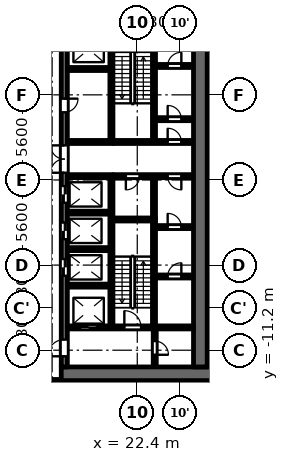
"""IFC4 building model, lengths in metres.
Left out: names, types, materials, properties, quantities, classifications, styles, units other than length and angle.
Written with IfcOpenShell. Run it as: python <this file> out.ifc"""

import sys

from ifc_helpers import new_model, si_unit, direction, frame, frame_2d, origin, origin_2d, place, context, subcontext, project, spatial, polyline, rectangle, outline, extrude, element, fill, save


model = new_model("IFC4")
c1 = context("Model", 3, precision=1e-05, world=origin(), true_north=direction((0.0, 1.0)))
c2 = subcontext(c1, "Body", "Model", "MODEL_VIEW")
j1 = project(units=[si_unit("LENGTHUNIT", "METRE"), si_unit("PLANEANGLEUNIT", "RADIAN")], contexts=[c1])
p1 = place(None, origin())
s1 = spatial("IfcSite", under=j1, at=p1, CompositionType="ELEMENT")
p2 = place(p1, origin())
s2 = spatial("IfcBuilding", under=s1, at=p2, CompositionType="ELEMENT")
p3 = place(p2, frame((0.0, 0.0, -4.5)))
s3 = spatial("IfcBuildingStorey", under=s2, at=p3, CompositionType="ELEMENT", Elevation=-4.5)
p4 = place(p3, frame((0.0, 0.0, -0.5)))
e1 = element("IfcWall", 1, at=p4, inside=s3, PredefinedType="SOLIDWALL", context=c2, shape_type="SweptSolid", body=[
    extrude(outline(polyline([(29.45, -10.0), (28.95, -10.0), (28.95, -14.49), (28.472, -16.996), (27.038, -19.105), (26.144, -20.0), (26.851, -20.0), (27.425, -19.426), (28.944, -17.191), (29.45, -14.537), (29.45, -10.0)])), origin(), (0.0, 0.0, 1.0), 5.0),
])
for number, where, z_axis, x_axis in (
    (2, (28.0, -11.2, 0.0), (0.0, 0.0, 1.0), (1.0, 0.0, 0.0)),
    (3, (28.0, -5.6, 0.0), (0.0, 0.0, 1.0), (1.0, 0.0, 0.0)),
    (4, (28.0, 0.0, 0.0), (0.0, 0.0, 1.0), (1.0, 0.0, 0.0)),
    (5, (28.0, 5.6, 0.0), (0.0, 0.0, 1.0), (1.0, 0.0, 0.0)),
):
    element("IfcColumn", number, at=place(p3, frame(where, z_axis=z_axis, x_axis=x_axis)), inside=s3, PredefinedType="COLUMN", context=c2, shape_type="SweptSolid", body=[
        extrude(rectangle(XDim=1.8, YDim=1.8, at=origin_2d()), origin(), (0.0, 0.0, 1.0), 4.5),
    ])
p5 = place(p3, frame((23.5, -2.5, 0.0), z_axis=(0.0, 0.0, 1.0), x_axis=(0.0, 1.0, 0.0)))
e6 = element("IfcWall", 6, at=p5, inside=s3, PredefinedType="PARTITIONING", context=c2, shape_type="SweptSolid", body=[
    extrude(rectangle(XDim=2.65, YDim=0.2, at=frame_2d((1.325, 0.0))), origin(), (0.0, 0.0, 1.0), 4.05),
])
p6 = place(p3, frame((20.7, 2.6, 0.0), z_axis=(0.0, 0.0, 1.0), x_axis=(0.0, 1.0, 0.0)))
e7 = element("IfcWall", 7, at=p6, inside=s3, PredefinedType="SHEAR", context=c2, shape_type="SweptSolid", body=[
    extrude(rectangle(XDim=7.0, YDim=0.2, at=frame_2d((3.5, 0.0))), origin(), (0.0, 0.0, 1.0), 4.05),
])
p7 = place(p3, frame((20.7, -9.6, 0.0), z_axis=(0.0, 0.0, 1.0), x_axis=(0.0, 1.0, 0.0)))
e8 = element("IfcWall", 8, at=p7, inside=s3, PredefinedType="SHEAR", context=c2, shape_type="SweptSolid", body=[
    extrude(rectangle(XDim=9.75, YDim=0.2, at=frame_2d((4.875, 0.0))), origin(), (0.0, 0.0, 1.0), 4.05),
])
p8 = place(p3, frame((20.8, 2.5, 0.0), z_axis=(0.0, 0.0, 1.0), x_axis=(1.0, 0.0, 0.0)))
e9 = element("IfcWall", 9, at=p8, inside=s3, PredefinedType="SHEAR", context=c2, shape_type="SweptSolid", body=[
    extrude(rectangle(XDim=5.3, YDim=0.2, at=frame_2d((2.65, 0.0))), origin(), (0.0, 0.0, 1.0), 4.05),
])
p9 = place(p8, frame((3.6, 0.0, 0.0)))
e10 = element("IfcOpeningElement", 10, at=p9, cuts=e9, PredefinedType="OPENING", context=c2, shape_type="SweptSolid", body=[
    extrude(rectangle(XDim=0.9, YDim=2.1, at=frame_2d((0.45, 1.05))), frame((0.0, 0.11, 0.0), z_axis=(0.0, -1.0, 0.0), x_axis=(1.0, 0.0, 0.0)), (0.0, 0.0, 1.0), 0.22),
])
p10 = place(p3, frame((20.8, 0.25, 0.0), z_axis=(0.0, 0.0, 1.0), x_axis=(1.0, 0.0, 0.0)))
e11 = element("IfcWall", 11, at=p10, inside=s3, PredefinedType="PARTITIONING", context=c2, shape_type="SweptSolid", body=[
    extrude(rectangle(XDim=5.3, YDim=0.2, at=frame_2d((2.65, 0.0))), origin(), (0.0, 0.0, 1.0), 4.05),
])
p11 = place(p10, frame((0.85, 0.0, 0.0)))
e12 = element("IfcOpeningElement", 12, at=p11, cuts=e11, PredefinedType="OPENING", context=c2, shape_type="SweptSolid", body=[
    extrude(rectangle(XDim=0.9, YDim=2.1, at=frame_2d((0.45, 1.05))), frame((0.0, 0.11, 0.0), z_axis=(0.0, -1.0, 0.0), x_axis=(1.0, 0.0, 0.0)), (0.0, 0.0, 1.0), 0.22),
])
p12 = place(p10, frame((3.6, 0.0, 0.0)))
e13 = element("IfcOpeningElement", 13, at=p12, cuts=e11, PredefinedType="OPENING", context=c2, shape_type="SweptSolid", body=[
    extrude(rectangle(XDim=0.9, YDim=2.1, at=frame_2d((0.45, 1.05))), frame((0.0, 0.11, 0.0), z_axis=(0.0, -1.0, 0.0), x_axis=(1.0, 0.0, 0.0)), (0.0, 0.0, 1.0), 0.22),
])
p13 = place(p3, frame((17.4, -12.75, 0.0), z_axis=(0.0, 0.0, 1.0), x_axis=(1.0, 0.0, 0.0)))
e14 = element("IfcWall", 14, at=p13, inside=s3, PredefinedType="SHEAR", context=c2, shape_type="SweptSolid", body=[
    extrude(rectangle(XDim=10.4, YDim=0.9, at=frame_2d((5.2, 0.0))), origin(), (0.0, 0.0, 1.0), 4.05),
])
p14 = place(p3, frame((17.6, -12.3, 0.0), z_axis=(0.0, 0.0, 1.0), x_axis=(0.0, 1.0, 0.0)))
e15 = element("IfcWall", 15, at=p14, inside=s3, PredefinedType="SHEAR", context=c2, shape_type="SweptSolid", body=[
    extrude(rectangle(XDim=24.6, YDim=0.4, at=frame_2d((12.3, 0.0))), origin(), (0.0, 0.0, 1.0), 4.05),
])
p15 = place(p14, frame((6.0, 0.0, 0.0)))
e16 = element("IfcOpeningElement", 16, at=p15, cuts=e15, PredefinedType="OPENING", context=c2, shape_type="SweptSolid", body=[
    extrude(rectangle(XDim=1.1, YDim=2.1, at=frame_2d((0.55, 1.05))), frame((0.0, 0.21, 0.0), z_axis=(0.0, -1.0, 0.0), x_axis=(1.0, 0.0, 0.0)), (0.0, 0.0, 1.0), 0.42),
])
p16 = place(p14, frame((8.4, 0.0, 0.0)))
e17 = element("IfcOpeningElement", 17, at=p16, cuts=e15, PredefinedType="OPENING", context=c2, shape_type="SweptSolid", body=[
    extrude(rectangle(XDim=1.1, YDim=2.1, at=frame_2d((0.55, 1.05))), frame((0.0, 0.21, 0.0), z_axis=(0.0, -1.0, 0.0), x_axis=(1.0, 0.0, 0.0)), (0.0, 0.0, 1.0), 0.42),
])
p17 = place(p14, frame((10.8, 0.0, 0.0)))
e18 = element("IfcOpeningElement", 18, at=p17, cuts=e15, PredefinedType="OPENING", context=c2, shape_type="SweptSolid", body=[
    extrude(rectangle(XDim=1.1, YDim=2.1, at=frame_2d((0.55, 1.05))), frame((0.0, 0.21, 0.0), z_axis=(0.0, -1.0, 0.0), x_axis=(1.0, 0.0, 0.0)), (0.0, 0.0, 1.0), 0.42),
])
p18 = place(p14, frame((16.75, 0.0, 0.0)))
e19 = element("IfcOpeningElement", 19, at=p18, cuts=e15, PredefinedType="OPENING", context=c2, shape_type="SweptSolid", body=[
    extrude(rectangle(XDim=0.9, YDim=2.1, at=frame_2d((0.45, 1.05))), frame((0.0, 0.21, 0.0), z_axis=(0.0, -1.0, 0.0), x_axis=(1.0, 0.0, 0.0)), (0.0, 0.0, 1.0), 0.42),
])
p19 = place(p14, frame((22.8, 0.0, 0.0)))
e20 = element("IfcOpeningElement", 20, at=p19, cuts=e15, PredefinedType="OPENING", context=c2, shape_type="SweptSolid", body=[
    extrude(rectangle(XDim=1.1, YDim=2.1, at=frame_2d((0.55, 1.05))), frame((0.0, 0.21, 0.0), z_axis=(0.0, -1.0, 0.0), x_axis=(1.0, 0.0, 0.0)), (0.0, 0.0, 1.0), 0.42),
])
p20 = place(p14, frame((0.7, 0.0, 0.0)))
e21 = element("IfcOpeningElement", 21, at=p20, cuts=e15, PredefinedType="OPENING", context=c2, shape_type="SweptSolid", body=[
    extrude(rectangle(XDim=1.1, YDim=2.1, at=frame_2d((0.55, 1.05))), frame((0.0, 0.21, 0.0), z_axis=(0.0, -1.0, 0.0), x_axis=(1.0, 0.0, 0.0)), (0.0, 0.0, 1.0), 0.42),
])
p21 = place(p14, frame((12.775, 0.0, 0.0)))
e22 = element("IfcOpeningElement", 22, at=p21, cuts=e15, PredefinedType="OPENING", context=c2, shape_type="SweptSolid", body=[
    extrude(rectangle(XDim=1.8, YDim=2.1, at=frame_2d((0.9, 1.05))), frame((0.0, 0.21, 0.0), z_axis=(0.0, -1.0, 0.0), x_axis=(1.0, 0.0, 0.0)), (0.0, 0.0, 1.0), 0.42),
])
p22 = place(p3, frame((26.55, -12.3, 0.0), z_axis=(0.0, 0.0, 1.0), x_axis=(0.0, 1.0, 0.0)))
e23 = element("IfcWall", 23, at=p22, inside=s3, PredefinedType="SHEAR", context=c2, shape_type="SweptSolid", body=[
    extrude(rectangle(XDim=24.6, YDim=0.9, at=frame_2d((12.3, 0.0))), origin(), (0.0, 0.0, 1.0), 4.05),
])
p23 = place(p3, frame((23.55, -12.3, 0.0), z_axis=(0.0, 0.0, 1.0), x_axis=(0.0, 1.0, 0.0)))
e24 = element("IfcWall", 24, at=p23, inside=s3, PredefinedType="PARTITIONING", context=c2, shape_type="SweptSolid", body=[
    extrude(rectangle(XDim=2.5, YDim=0.2, at=frame_2d((1.25, 0.0))), origin(), (0.0, 0.0, 1.0), 4.05),
])
p24 = place(p23, frame((0.8, 0.0, 0.0)))
e25 = element("IfcOpeningElement", 25, at=p24, cuts=e24, PredefinedType="OPENING", context=c2, shape_type="SweptSolid", body=[
    extrude(rectangle(XDim=0.9, YDim=2.1, at=frame_2d((0.45, 1.05))), frame((0.0, 0.11, 0.0), z_axis=(0.0, -1.0, 0.0), x_axis=(1.0, 0.0, 0.0)), (0.0, 0.0, 1.0), 0.22),
])
p25 = place(p3, frame((23.6, -6.35, 0.0), z_axis=(0.0, 0.0, 1.0), x_axis=(1.0, 0.0, 0.0)))
e26 = element("IfcWall", 26, at=p25, inside=s3, PredefinedType="PARTITIONING", context=c2, shape_type="SweptSolid", body=[
    extrude(rectangle(XDim=2.5, YDim=0.2, at=frame_2d((1.25, 0.0))), origin(), (0.0, 0.0, 1.0), 4.05),
])
p26 = place(p25, frame((0.8, 0.0, 0.0)))
e27 = element("IfcOpeningElement", 27, at=p26, cuts=e26, PredefinedType="OPENING", context=c2, shape_type="SweptSolid", body=[
    extrude(rectangle(XDim=0.9, YDim=2.1, at=frame_2d((0.45, 1.05))), frame((0.0, 0.11, 0.0), z_axis=(0.0, -1.0, 0.0), x_axis=(1.0, 0.0, 0.0)), (0.0, 0.0, 1.0), 0.22),
])
p27 = place(p3, frame((23.6, -3.1, 0.0), z_axis=(0.0, 0.0, 1.0), x_axis=(1.0, 0.0, 0.0)))
e28 = element("IfcWall", 28, at=p27, inside=s3, PredefinedType="PARTITIONING", context=c2, shape_type="SweptSolid", body=[
    extrude(rectangle(XDim=2.5, YDim=0.2, at=frame_2d((1.25, 0.0))), origin(), (0.0, 0.0, 1.0), 4.05),
])
p28 = place(p27, frame((0.8, 0.0, 0.0)))
e29 = element("IfcOpeningElement", 29, at=p28, cuts=e28, PredefinedType="OPENING", context=c2, shape_type="SweptSolid", body=[
    extrude(rectangle(XDim=0.9, YDim=2.1, at=frame_2d((0.45, 1.05))), frame((0.0, 0.11, 0.0), z_axis=(0.0, -1.0, 0.0), x_axis=(1.0, 0.0, 0.0)), (0.0, 0.0, 1.0), 0.22),
])
p29 = place(p3, frame((23.6, 4.0, 0.0), z_axis=(0.0, 0.0, 1.0), x_axis=(1.0, 0.0, 0.0)))
e30 = element("IfcWall", 30, at=p29, inside=s3, PredefinedType="PARTITIONING", context=c2, shape_type="SweptSolid", body=[
    extrude(rectangle(XDim=2.5, YDim=0.2, at=frame_2d((1.25, 0.0))), origin(), (0.0, 0.0, 1.0), 4.05),
])
p30 = place(p29, frame((0.8, 0.0, 0.0)))
e31 = element("IfcOpeningElement", 31, at=p30, cuts=e30, PredefinedType="OPENING", context=c2, shape_type="SweptSolid", body=[
    extrude(rectangle(XDim=0.9, YDim=2.1, at=frame_2d((0.45, 1.05))), frame((0.0, 0.11, 0.0), z_axis=(0.0, -1.0, 0.0), x_axis=(1.0, 0.0, 0.0)), (0.0, 0.0, 1.0), 0.22),
])
p31 = place(p3, frame((23.6, 7.5, 0.0), z_axis=(0.0, 0.0, 1.0), x_axis=(1.0, 0.0, 0.0)))
e32 = element("IfcWall", 32, at=p31, inside=s3, PredefinedType="PARTITIONING", context=c2, shape_type="SweptSolid", body=[
    extrude(rectangle(XDim=2.5, YDim=0.2, at=frame_2d((1.25, 0.0))), origin(), (0.0, 0.0, 1.0), 4.05),
])
p32 = place(p31, frame((0.8, 0.0, 0.0)))
e33 = element("IfcOpeningElement", 33, at=p32, cuts=e32, PredefinedType="OPENING", context=c2, shape_type="SweptSolid", body=[
    extrude(rectangle(XDim=0.9, YDim=2.1, at=frame_2d((0.45, 1.05))), frame((0.0, 0.11, 0.0), z_axis=(0.0, -1.0, 0.0), x_axis=(1.0, 0.0, 0.0)), (0.0, 0.0, 1.0), 0.22),
])
p33 = place(p3, frame((17.8, -9.7, 0.0), z_axis=(0.0, 0.0, 1.0), x_axis=(1.0, 0.0, 0.0)))
e34 = element("IfcWall", 34, at=p33, inside=s3, PredefinedType="SHEAR", context=c2, shape_type="SweptSolid", body=[
    extrude(rectangle(XDim=8.3, YDim=0.2, at=frame_2d((4.15, 0.0))), origin(), (0.0, 0.0, 1.0), 4.05),
])
p34 = place(p33, frame((0.85, 0.0, 0.0)))
e35 = element("IfcOpeningElement", 35, at=p34, cuts=e34, PredefinedType="OPENING", context=c2, shape_type="SweptSolid", body=[
    extrude(rectangle(XDim=1.1, YDim=2.1, at=frame_2d((0.55, 1.05))), frame((0.0, 0.11, 0.0), z_axis=(0.0, -1.0, 0.0), x_axis=(1.0, 0.0, 0.0)), (0.0, 0.0, 1.0), 0.22),
])
p35 = place(p33, frame((3.75, 0.0, 0.0)))
e36 = element("IfcOpeningElement", 36, at=p35, cuts=e34, PredefinedType="OPENING", context=c2, shape_type="SweptSolid", body=[
    extrude(rectangle(XDim=1.1, YDim=2.1, at=frame_2d((0.55, 1.05))), frame((0.0, 0.11, 0.0), z_axis=(0.0, -1.0, 0.0), x_axis=(1.0, 0.0, 0.0)), (0.0, 0.0, 1.0), 0.22),
])
for number, where, z_axis, x_axis in (
    (37, (17.8, -6.95, 0.0), (0.0, 0.0, 1.0), (1.0, 0.0, 0.0)),
    (38, (17.8, -4.55, 0.0), (0.0, 0.0, 1.0), (1.0, 0.0, 0.0)),
    (39, (17.8, -2.15, 0.0), (0.0, 0.0, 1.0), (1.0, 0.0, 0.0)),
):
    element("IfcWall", number, at=place(p3, frame(where, z_axis=z_axis, x_axis=x_axis)), inside=s3, PredefinedType="PARTITIONING", context=c2, shape_type="SweptSolid", body=[
        extrude(rectangle(XDim=2.8, YDim=0.2, at=frame_2d((1.4, 0.0))), origin(), (0.0, 0.0, 1.0), 4.05),
    ])
for number, where, z_axis, x_axis in (
    (40, (17.8, 0.25, 0.0), (0.0, 0.0, 1.0), (1.0, 0.0, 0.0)),
    (41, (17.8, 2.5, 0.0), (0.0, 0.0, 1.0), (1.0, 0.0, 0.0)),
):
    element("IfcWall", number, at=place(p3, frame(where, z_axis=z_axis, x_axis=x_axis)), inside=s3, PredefinedType="PARTITIONING", context=c2, shape_type="SweptSolid", body=[
        extrude(rectangle(XDim=3.0, YDim=0.2, at=frame_2d((1.5, 0.0))), origin(), (0.0, 0.0, 1.0), 4.05),
    ])
p36 = place(p3, frame((17.8, 7.3, 0.0), z_axis=(0.0, 0.0, 1.0), x_axis=(1.0, 0.0, 0.0)))
e42 = element("IfcWall", 42, at=p36, inside=s3, PredefinedType="PARTITIONING", context=c2, shape_type="SweptSolid", body=[
    extrude(rectangle(XDim=2.8, YDim=0.2, at=frame_2d((1.4, 0.0))), origin(), (0.0, 0.0, 1.0), 4.05),
])
p37 = place(p3, frame((23.5, 2.6, 0.0), z_axis=(0.0, 0.0, 1.0), x_axis=(0.0, 1.0, 0.0)))
e43 = element("IfcWall", 43, at=p37, inside=s3, PredefinedType="SHEAR", context=c2, shape_type="SweptSolid", body=[
    extrude(rectangle(XDim=7.0, YDim=0.2, at=frame_2d((3.5, 0.0))), origin(), (0.0, 0.0, 1.0), 4.05),
])
p38 = place(p3, frame((23.5, -9.6, 0.0), z_axis=(0.0, 0.0, 1.0), x_axis=(0.0, 1.0, 0.0)))
e44 = element("IfcWall", 44, at=p38, inside=s3, PredefinedType="SHEAR", context=c2, shape_type="SweptSolid", body=[
    extrude(rectangle(XDim=6.9, YDim=0.2, at=frame_2d((3.45, 0.0))), origin(), (0.0, 0.0, 1.0), 4.05),
])
p39 = place(p3, frame((20.8, -2.6, 0.0), z_axis=(0.0, 0.0, 1.0), x_axis=(1.0, 0.0, 0.0)))
e45 = element("IfcWall", 45, at=p39, inside=s3, PredefinedType="SHEAR", context=c2, shape_type="SweptSolid", body=[
    extrude(rectangle(XDim=2.8, YDim=0.2, at=frame_2d((1.4, 0.0))), origin(), (0.0, 0.0, 1.0), 4.05),
])
p40 = place(p3, frame((-17.4, -13.2, 0.0), z_axis=(0.0, 0.0, 1.0), x_axis=(1.0, 0.0, 0.0)))
e46 = element("IfcWall", 46, at=p40, inside=s3, PredefinedType="PARTITIONING", context=c2, shape_type="SweptSolid", body=[
    extrude(rectangle(XDim=34.8, YDim=0.15, at=frame_2d((17.4, 0.0))), origin(), (0.0, 0.0, 1.0), 4.05),
])
p41 = place(p40, frame((16.05, 0.0, 0.0)))
e47 = element("IfcOpeningElement", 47, at=p41, cuts=e46, PredefinedType="OPENING", context=c2, shape_type="SweptSolid", body=[
    extrude(rectangle(XDim=1.2, YDim=2.1, at=frame_2d((0.6, 1.05))), frame((0.0, 0.085, 0.0), z_axis=(0.0, -1.0, 0.0), x_axis=(1.0, 0.0, 0.0)), (0.0, 0.0, 1.0), 0.17),
])
p42 = place(p40, frame((0.65, 0.0, 0.0)))
e48 = element("IfcOpeningElement", 48, at=p42, cuts=e46, PredefinedType="OPENING", context=c2, shape_type="SweptSolid", body=[
    extrude(rectangle(XDim=1.0, YDim=2.1, at=frame_2d((0.5, 1.05))), frame((0.0, 0.085, 0.0), z_axis=(0.0, -1.0, 0.0), x_axis=(1.0, 0.0, 0.0)), (0.0, 0.0, 1.0), 0.17),
])
p43 = place(p40, frame((33.05, 0.0, 0.0)))
e49 = element("IfcOpeningElement", 49, at=p43, cuts=e46, PredefinedType="OPENING", context=c2, shape_type="SweptSolid", body=[
    extrude(rectangle(XDim=1.0, YDim=2.1, at=frame_2d((0.5, 1.05))), frame((0.0, 0.085, 0.0), z_axis=(0.0, -1.0, 0.0), x_axis=(1.0, 0.0, 0.0)), (0.0, 0.0, 1.0), 0.17),
])
p44 = place(p34, origin())
e50 = element("IfcDoor", 50, at=p44, inside=s3, OperationType="DOUBLE_DOOR_SLIDING", PredefinedType="DOOR", context=c2, shape_type="SweptSolid", body=[
    extrude(rectangle(XDim=1.1, YDim=2.1, at=frame_2d((0.55, 1.05))), frame((0.0, 0.025, 0.0), z_axis=(0.0, -1.0, 0.0), x_axis=(1.0, 0.0, 0.0)), (0.0, 0.0, 1.0), 0.05),
])
fill(e35, e50)
p45 = place(p15, origin())
e51 = element("IfcDoor", 51, at=p45, inside=s3, OperationType="DOUBLE_DOOR_SLIDING", PredefinedType="DOOR", context=c2, shape_type="SweptSolid", body=[
    extrude(rectangle(XDim=1.1, YDim=2.1, at=frame_2d((0.55, 1.05))), frame((0.0, 0.025, 0.0), z_axis=(0.0, -1.0, 0.0), x_axis=(1.0, 0.0, 0.0)), (0.0, 0.0, 1.0), 0.05),
])
fill(e16, e51)
p46 = place(p16, origin())
e52 = element("IfcDoor", 52, at=p46, inside=s3, OperationType="DOUBLE_DOOR_SLIDING", PredefinedType="DOOR", context=c2, shape_type="SweptSolid", body=[
    extrude(rectangle(XDim=1.1, YDim=2.1, at=frame_2d((0.55, 1.05))), frame((0.0, 0.025, 0.0), z_axis=(0.0, -1.0, 0.0), x_axis=(1.0, 0.0, 0.0)), (0.0, 0.0, 1.0), 0.05),
])
fill(e17, e52)
p47 = place(p17, origin())
e53 = element("IfcDoor", 53, at=p47, inside=s3, OperationType="DOUBLE_DOOR_SLIDING", PredefinedType="DOOR", context=c2, shape_type="SweptSolid", body=[
    extrude(rectangle(XDim=1.1, YDim=2.1, at=frame_2d((0.55, 1.05))), frame((0.0, 0.025, 0.0), z_axis=(0.0, -1.0, 0.0), x_axis=(1.0, 0.0, 0.0)), (0.0, 0.0, 1.0), 0.05),
])
fill(e18, e53)
p48 = place(p18, origin())
e54 = element("IfcDoor", 54, at=p48, inside=s3, OperationType="SINGLE_SWING_RIGHT", PredefinedType="DOOR", context=c2, shape_type="SweptSolid", body=[
    extrude(rectangle(XDim=0.9, YDim=2.1, at=frame_2d((0.45, 1.05))), frame((0.0, 0.025, 0.0), z_axis=(0.0, -1.0, 0.0), x_axis=(1.0, 0.0, 0.0)), (0.0, 0.0, 1.0), 0.05),
])
fill(e19, e54)
p49 = place(p20, origin())
e55 = element("IfcDoor", 55, at=p49, inside=s3, OperationType="SINGLE_SWING_RIGHT", PredefinedType="DOOR", context=c2, shape_type="SweptSolid", body=[
    extrude(rectangle(XDim=1.1, YDim=2.1, at=frame_2d((0.55, 1.05))), frame((0.0, 0.025, 0.0), z_axis=(0.0, -1.0, 0.0), x_axis=(1.0, 0.0, 0.0)), (0.0, 0.0, 1.0), 0.05),
])
fill(e21, e55)
p50 = place(p24, origin())
e56 = element("IfcDoor", 56, at=p50, inside=s3, OperationType="SINGLE_SWING_LEFT", PredefinedType="DOOR", context=c2, shape_type="SweptSolid", body=[
    extrude(rectangle(XDim=0.9, YDim=2.1, at=frame_2d((0.45, 1.05))), frame((0.0, 0.025, 0.0), z_axis=(0.0, -1.0, 0.0), x_axis=(1.0, 0.0, 0.0)), (0.0, 0.0, 1.0), 0.05),
])
fill(e25, e56)
p51 = place(p35, origin())
e57 = element("IfcDoor", 57, at=p51, inside=s3, OperationType="SINGLE_SWING_RIGHT", PredefinedType="DOOR", context=c2, shape_type="SweptSolid", body=[
    extrude(rectangle(XDim=1.1, YDim=2.1, at=frame_2d((0.55, 1.05))), frame((0.0, 0.025, 0.0), z_axis=(0.0, -1.0, 0.0), x_axis=(1.0, 0.0, 0.0)), (0.0, 0.0, 1.0), 0.05),
])
fill(e36, e57)
p52 = place(p21, origin())
e58 = element("IfcDoor", 58, at=p52, inside=s3, OperationType="DOUBLE_DOOR_SINGLE_SWING", PredefinedType="DOOR", context=c2, shape_type="SweptSolid", body=[
    extrude(rectangle(XDim=1.8, YDim=2.1, at=frame_2d((0.9, 1.05))), frame((0.0, 0.025, 0.0), z_axis=(0.0, -1.0, 0.0), x_axis=(1.0, 0.0, 0.0)), (0.0, 0.0, 1.0), 0.05),
])
fill(e22, e58)
p53 = place(p11, origin())
e59 = element("IfcDoor", 59, at=p53, inside=s3, OperationType="SINGLE_SWING_LEFT", PredefinedType="DOOR", context=c2, shape_type="SweptSolid", body=[
    extrude(rectangle(XDim=0.9, YDim=2.1, at=frame_2d((0.45, 1.05))), frame((0.0, 0.025, 0.0), z_axis=(0.0, -1.0, 0.0), x_axis=(1.0, 0.0, 0.0)), (0.0, 0.0, 1.0), 0.05),
])
fill(e12, e59)
p54 = place(p26, origin())
e60 = element("IfcDoor", 60, at=p54, inside=s3, OperationType="SINGLE_SWING_LEFT", PredefinedType="DOOR", context=c2, shape_type="SweptSolid", body=[
    extrude(rectangle(XDim=0.9, YDim=2.1, at=frame_2d((0.45, 1.05))), frame((0.0, 0.025, 0.0), z_axis=(0.0, -1.0, 0.0), x_axis=(1.0, 0.0, 0.0)), (0.0, 0.0, 1.0), 0.05),
])
fill(e27, e60)
p55 = place(p28, origin())
e61 = element("IfcDoor", 61, at=p55, inside=s3, OperationType="SINGLE_SWING_RIGHT", PredefinedType="DOOR", context=c2, shape_type="SweptSolid", body=[
    extrude(rectangle(XDim=0.9, YDim=2.1, at=frame_2d((0.45, 1.05))), frame((0.0, 0.025, 0.0), z_axis=(0.0, -1.0, 0.0), x_axis=(1.0, 0.0, 0.0)), (0.0, 0.0, 1.0), 0.05),
])
fill(e29, e61)
p56 = place(p12, origin())
e62 = element("IfcDoor", 62, at=p56, inside=s3, OperationType="SINGLE_SWING_RIGHT", PredefinedType="DOOR", context=c2, shape_type="SweptSolid", body=[
    extrude(rectangle(XDim=0.9, YDim=2.1, at=frame_2d((0.45, 1.05))), frame((0.0, 0.025, 0.0), z_axis=(0.0, -1.0, 0.0), x_axis=(1.0, 0.0, 0.0)), (0.0, 0.0, 1.0), 0.05),
])
fill(e13, e62)
p57 = place(p30, origin())
e63 = element("IfcDoor", 63, at=p57, inside=s3, OperationType="SINGLE_SWING_RIGHT", PredefinedType="DOOR", context=c2, shape_type="SweptSolid", body=[
    extrude(rectangle(XDim=0.9, YDim=2.1, at=frame_2d((0.45, 1.05))), frame((0.0, 0.025, 0.0), z_axis=(0.0, -1.0, 0.0), x_axis=(1.0, 0.0, 0.0)), (0.0, 0.0, 1.0), 0.05),
])
fill(e31, e63)
p58 = place(p32, origin())
e64 = element("IfcDoor", 64, at=p58, inside=s3, OperationType="SINGLE_SWING_LEFT", PredefinedType="DOOR", context=c2, shape_type="SweptSolid", body=[
    extrude(rectangle(XDim=0.9, YDim=2.1, at=frame_2d((0.45, 1.05))), frame((0.0, 0.025, 0.0), z_axis=(0.0, -1.0, 0.0), x_axis=(1.0, 0.0, 0.0)), (0.0, 0.0, 1.0), 0.05),
])
fill(e33, e64)
p59 = place(p9, origin())
e65 = element("IfcDoor", 65, at=p59, inside=s3, OperationType="SINGLE_SWING_RIGHT", PredefinedType="DOOR", context=c2, shape_type="SweptSolid", body=[
    extrude(rectangle(XDim=0.9, YDim=2.1, at=frame_2d((0.45, 1.05))), frame((0.0, 0.025, 0.0), z_axis=(0.0, -1.0, 0.0), x_axis=(1.0, 0.0, 0.0)), (0.0, 0.0, 1.0), 0.05),
])
fill(e10, e65)
save(model, sys.argv[1])
